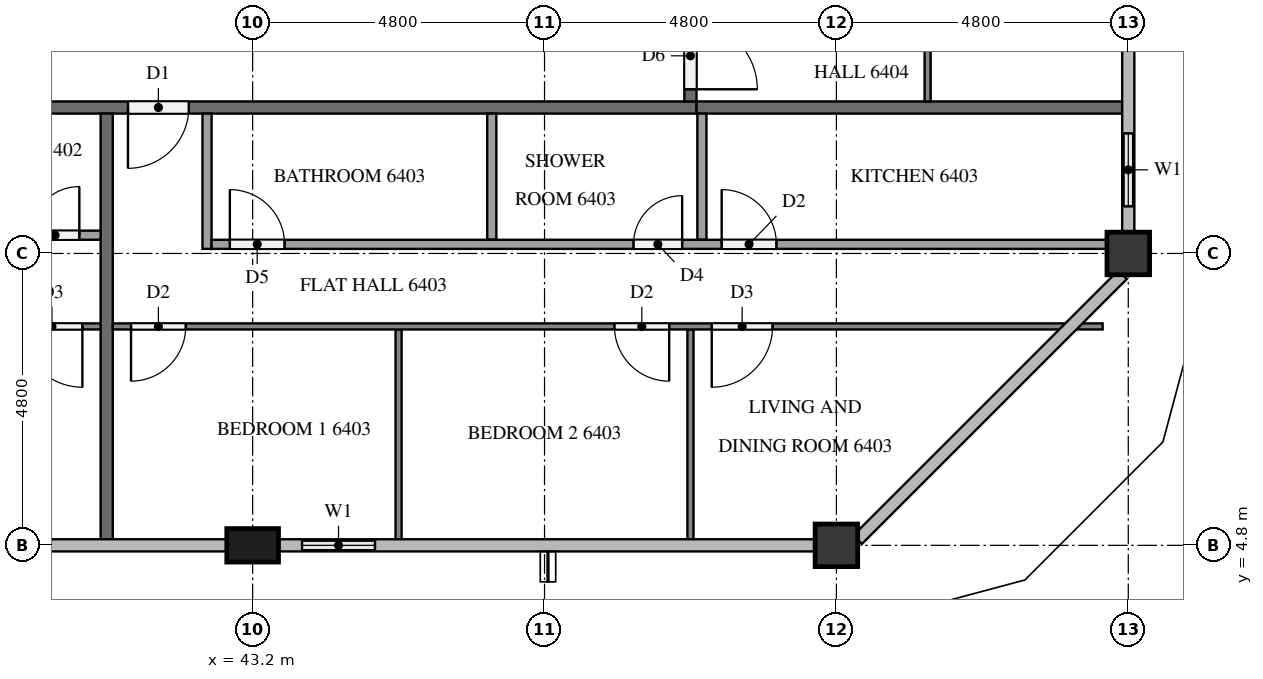
"""IFC4 building model, lengths in metres.
Left out: names, types, materials, properties, quantities, classifications, styles, units other than length and angle.
Written with IfcOpenShell. Run it as: python <this file> out.ifc"""

import sys

from ifc_helpers import new_model, si_unit, direction, frame, frame_2d, origin, origin_2d, place, context, subcontext, project, spatial, rectangle, extrude, element, fill, save


model = new_model("IFC4")
c1 = context("Model", 3, precision=1e-05, world=origin(), true_north=direction((0.0, 1.0)))
c2 = subcontext(c1, "Body", "Model", "MODEL_VIEW")
j1 = project(units=[si_unit("LENGTHUNIT", "METRE"), si_unit("PLANEANGLEUNIT", "RADIAN")], contexts=[c1])
p1 = place(None, origin())
s1 = spatial("IfcSite", under=j1, at=p1, CompositionType="ELEMENT")
p2 = place(p1, origin())
s2 = spatial("IfcBuilding", under=s1, at=p2, CompositionType="ELEMENT")
p3 = place(p2, frame((0.0, 0.0, 245.7)))
s3 = spatial("IfcBuildingStorey", under=s2, at=p3, CompositionType="ELEMENT", Elevation=245.7)
p4 = place(p3, frame((43.2, 4.8, 0.0), z_axis=(0.0, 0.0, 1.0), x_axis=(1.0, 0.0, 0.0)))
e1 = element("IfcColumn", 1, at=p4, inside=s3, PredefinedType="COLUMN", context=c2, shape_type="SweptSolid", body=[
    extrude(rectangle(XDim=0.85, YDim=0.55, at=origin_2d()), origin(), (0.0, 0.0, 1.0), 3.2),
])
for number, where, z_axis, x_axis in (
    (2, (52.8, 4.8, 0.0), (0.0, 0.0, 1.0), (1.0, 0.0, 0.0)),
    (3, (57.6, 9.6, 0.0), (0.0, 0.0, 1.0), (1.0, 0.0, 0.0)),
):
    element("IfcColumn", number, at=place(p3, frame(where, z_axis=z_axis, x_axis=x_axis)), inside=s3, PredefinedType="COLUMN", context=c2, shape_type="SweptSolid", body=[
        extrude(rectangle(XDim=0.7, YDim=0.7, at=origin_2d()), origin(), (0.0, 0.0, 1.0), 3.2),
    ])
p5 = place(p3, frame((43.625, 4.8, 0.0), z_axis=(0.0, 0.0, 1.0), x_axis=(1.0, 0.0, 0.0)))
e4 = element("IfcWall", 4, at=p5, inside=s3, PredefinedType="SOLIDWALL", context=c2, shape_type="SweptSolid", body=[
    extrude(rectangle(XDim=1.975, YDim=0.15, at=frame_2d((0.988, 0.0))), origin(), (0.0, 0.0, 1.0), 3.2),
])
p6 = place(p5, frame((0.387, 0.0, 0.9)))
e5 = element("IfcOpeningElement", 5, at=p6, cuts=e4, PredefinedType="OPENING", context=c2, shape_type="SweptSolid", body=[
    extrude(rectangle(XDim=1.2, YDim=1.4, at=frame_2d((0.6, 0.7))), frame((0.0, 0.085, 0.0), z_axis=(0.0, -1.0, 0.0), x_axis=(1.0, 0.0, 0.0)), (0.0, 0.0, 1.0), 0.17),
])
p7 = place(p3, frame((57.6, 9.95, 0.0), z_axis=(0.0, 0.0, 1.0), x_axis=(0.0, 1.0, 0.0)))
e6 = element("IfcWall", 6, at=p7, inside=s3, PredefinedType="SOLIDWALL", context=c2, shape_type="SweptSolid", body=[
    extrude(rectangle(XDim=2.05, YDim=0.15, at=frame_2d((1.025, 0.0))), origin(), (0.0, 0.0, 1.0), 3.2),
])
p8 = place(p7, frame((0.425, 0.0, 0.9)))
e7 = element("IfcOpeningElement", 7, at=p8, cuts=e6, PredefinedType="OPENING", context=c2, shape_type="SweptSolid", body=[
    extrude(rectangle(XDim=1.2, YDim=1.4, at=frame_2d((0.6, 0.7))), frame((0.0, 0.085, 0.0), z_axis=(0.0, -1.0, 0.0), x_axis=(1.0, 0.0, 0.0)), (0.0, 0.0, 1.0), 0.17),
])
p9 = place(p3, frame((50.5, 12.0, 0.0), z_axis=(0.0, 0.0, 1.0), x_axis=(-1.0, 0.0, 0.0)))
e8 = element("IfcWall", 8, at=p9, inside=s3, PredefinedType="PARTITIONING", context=c2, shape_type="SweptSolid", body=[
    extrude(rectangle(XDim=38.6, YDim=0.2, at=frame_2d((19.3, 0.0))), origin(), (0.0, 0.0, 1.0), 3.2),
])
p10 = place(p9, frame((37.1, 0.0, 0.0)))
e9 = element("IfcOpeningElement", 9, at=p10, cuts=e8, PredefinedType="OPENING", context=c2, shape_type="SweptSolid", body=[
    extrude(rectangle(XDim=1.1, YDim=2.1, at=frame_2d((0.55, 1.05))), frame((0.0, 0.11, 0.0), z_axis=(0.0, -1.0, 0.0), x_axis=(1.0, 0.0, 0.0)), (0.0, 0.0, 1.0), 0.22),
])
p11 = place(p9, frame((17.95, 0.0, 0.0)))
e10 = element("IfcOpeningElement", 10, at=p11, cuts=e8, PredefinedType="OPENING", context=c2, shape_type="SweptSolid", body=[
    extrude(rectangle(XDim=1.0, YDim=2.1, at=frame_2d((0.5, 1.05))), frame((0.0, 0.11, 0.0), z_axis=(0.0, -1.0, 0.0), x_axis=(1.0, 0.0, 0.0)), (0.0, 0.0, 1.0), 0.22),
])
p12 = place(p9, frame((8.35, 0.0, 0.0)))
e11 = element("IfcOpeningElement", 11, at=p12, cuts=e8, PredefinedType="OPENING", context=c2, shape_type="SweptSolid", body=[
    extrude(rectangle(XDim=1.0, YDim=2.1, at=frame_2d((0.5, 1.05))), frame((0.0, 0.11, 0.0), z_axis=(0.0, -1.0, 0.0), x_axis=(1.0, 0.0, 0.0)), (0.0, 0.0, 1.0), 0.22),
])
p13 = place(p3, frame((50.4, 40.7, 0.0), z_axis=(0.0, 0.0, 1.0), x_axis=(0.0, -1.0, 0.0)))
e12 = element("IfcWall", 12, at=p13, inside=s3, PredefinedType="PARTITIONING", context=c2, shape_type="SweptSolid", body=[
    extrude(rectangle(XDim=28.6, YDim=0.2, at=frame_2d((14.3, 0.0))), origin(), (0.0, 0.0, 1.0), 3.2),
])
p14 = place(p13, frame((27.3, 0.0, 0.0)))
e13 = element("IfcOpeningElement", 13, at=p14, cuts=e12, PredefinedType="OPENING", context=c2, shape_type="SweptSolid", body=[
    extrude(rectangle(XDim=1.1, YDim=2.1, at=frame_2d((0.55, 1.05))), frame((0.0, 0.11, 0.0), z_axis=(0.0, -1.0, 0.0), x_axis=(1.0, 0.0, 0.0)), (0.0, 0.0, 1.0), 0.22),
])
p15 = place(p13, frame((0.25, 0.0, 0.0)))
e14 = element("IfcOpeningElement", 14, at=p15, cuts=e12, PredefinedType="OPENING", context=c2, shape_type="SweptSolid", body=[
    extrude(rectangle(XDim=1.0, YDim=2.1, at=frame_2d((0.5, 1.05))), frame((0.0, 0.11, 0.0), z_axis=(0.0, -1.0, 0.0), x_axis=(1.0, 0.0, 0.0)), (0.0, 0.0, 1.0), 0.22),
])
for number, where, z_axis, x_axis in (
    (15, (40.8, 11.9, 0.0), (0.0, 0.0, 1.0), (0.0, -1.0, 0.0)),
    (16, (50.5, 12.0, 0.0), (0.0, 0.0, 1.0), (1.0, 0.0, 0.0)),
):
    element("IfcWall", number, at=place(p3, frame(where, z_axis=z_axis, x_axis=x_axis)), inside=s3, PredefinedType="PARTITIONING", context=c2, shape_type="SweptSolid", body=[
        extrude(rectangle(XDim=7.0, YDim=0.2, at=frame_2d((3.5, 0.0))), origin(), (0.0, 0.0, 1.0), 3.2),
    ])
p16 = place(p3, frame((40.7, 8.4, 0.0), z_axis=(0.0, 0.0, 1.0), x_axis=(-1.0, 0.0, 0.0)))
e17 = element("IfcWall", 17, at=p16, inside=s3, PredefinedType="PARTITIONING", context=c2, shape_type="SweptSolid", body=[
    extrude(rectangle(XDim=9.4, YDim=0.1, at=frame_2d((4.7, 0.0))), origin(), (0.0, 0.0, 1.0), 3.2),
])
p17 = place(p16, frame((8.2, 0.0, 0.0)))
e18 = element("IfcOpeningElement", 18, at=p17, cuts=e17, PredefinedType="OPENING", context=c2, shape_type="SweptSolid", body=[
    extrude(rectangle(XDim=0.9, YDim=2.1, at=frame_2d((0.45, 1.05))), frame((0.0, 0.06, 0.0), z_axis=(0.0, -1.0, 0.0), x_axis=(1.0, 0.0, 0.0)), (0.0, 0.0, 1.0), 0.12),
])
p18 = place(p16, frame((0.3, 0.0, 0.0)))
e19 = element("IfcOpeningElement", 19, at=p18, cuts=e17, PredefinedType="OPENING", context=c2, shape_type="SweptSolid", body=[
    extrude(rectangle(XDim=1.0, YDim=2.1, at=frame_2d((0.5, 1.05))), frame((0.0, 0.06, 0.0), z_axis=(0.0, -1.0, 0.0), x_axis=(1.0, 0.0, 0.0)), (0.0, 0.0, 1.0), 0.12),
])
p19 = place(p3, frame((32.925, 9.9, 0.0), z_axis=(0.0, 0.0, 1.0), x_axis=(1.0, 0.0, 0.0)))
e20 = element("IfcWall", 20, at=p19, inside=s3, PredefinedType="PARTITIONING", context=c2, shape_type="SweptSolid", body=[
    extrude(rectangle(XDim=7.775, YDim=0.15, at=frame_2d((3.887, 0.0))), origin(), (0.0, 0.0, 1.0), 3.2),
])
p20 = place(p19, frame((0.3, 0.0, 0.0)))
e21 = element("IfcOpeningElement", 21, at=p20, cuts=e20, PredefinedType="OPENING", context=c2, shape_type="SweptSolid", body=[
    extrude(rectangle(XDim=0.9, YDim=2.1, at=frame_2d((0.45, 1.05))), frame((0.0, 0.085, 0.0), z_axis=(0.0, -1.0, 0.0), x_axis=(1.0, 0.0, 0.0)), (0.0, 0.0, 1.0), 0.17),
])
p21 = place(p19, frame((6.625, 0.0, 0.0)))
e22 = element("IfcOpeningElement", 22, at=p21, cuts=e20, PredefinedType="OPENING", context=c2, shape_type="SweptSolid", body=[
    extrude(rectangle(XDim=0.8, YDim=2.1, at=frame_2d((0.4, 1.05))), frame((0.0, 0.085, 0.0), z_axis=(0.0, -1.0, 0.0), x_axis=(1.0, 0.0, 0.0)), (0.0, 0.0, 1.0), 0.17),
])
for number, where, z_axis, x_axis in (
    (23, (45.6, 8.35, 0.0), (0.0, 0.0, 1.0), (0.0, -1.0, 0.0)),
    (24, (50.4, 8.35, 0.0), (0.0, 0.0, 1.0), (0.0, -1.0, 0.0)),
):
    element("IfcWall", number, at=place(p3, frame(where, z_axis=z_axis, x_axis=x_axis)), inside=s3, PredefinedType="PARTITIONING", context=c2, shape_type="SweptSolid", body=[
        extrude(rectangle(XDim=3.45, YDim=0.1, at=frame_2d((1.725, 0.0))), origin(), (0.0, 0.0, 1.0), 3.2),
    ])
p22 = place(p3, frame((57.178, 8.4, 0.0), z_axis=(0.0, 0.0, 1.0), x_axis=(-1.0, 0.0, 0.0)))
e25 = element("IfcWall", 25, at=p22, inside=s3, PredefinedType="PARTITIONING", context=c2, shape_type="SweptSolid", body=[
    extrude(rectangle(XDim=16.279, YDim=0.1, at=frame_2d((8.139, 0.0))), origin(), (0.0, 0.0, 1.0), 3.2),
])
p23 = place(p22, frame((15.079, 0.0, 0.0)))
e26 = element("IfcOpeningElement", 26, at=p23, cuts=e25, PredefinedType="OPENING", context=c2, shape_type="SweptSolid", body=[
    extrude(rectangle(XDim=0.9, YDim=2.1, at=frame_2d((0.45, 1.05))), frame((0.0, 0.06, 0.0), z_axis=(0.0, -1.0, 0.0), x_axis=(1.0, 0.0, 0.0)), (0.0, 0.0, 1.0), 0.12),
])
p24 = place(p22, frame((7.128, 0.0, 0.0)))
e27 = element("IfcOpeningElement", 27, at=p24, cuts=e25, PredefinedType="OPENING", context=c2, shape_type="SweptSolid", body=[
    extrude(rectangle(XDim=0.9, YDim=2.1, at=frame_2d((0.45, 1.05))), frame((0.0, 0.06, 0.0), z_axis=(0.0, -1.0, 0.0), x_axis=(1.0, 0.0, 0.0)), (0.0, 0.0, 1.0), 0.12),
])
p25 = place(p22, frame((5.428, 0.0, 0.0)))
e28 = element("IfcOpeningElement", 28, at=p25, cuts=e25, PredefinedType="OPENING", context=c2, shape_type="SweptSolid", body=[
    extrude(rectangle(XDim=1.0, YDim=2.1, at=frame_2d((0.5, 1.05))), frame((0.0, 0.06, 0.0), z_axis=(0.0, -1.0, 0.0), x_axis=(1.0, 0.0, 0.0)), (0.0, 0.0, 1.0), 0.12),
])
for number, where, z_axis, x_axis in (
    (29, (47.133, 11.9, 0.0), (0.0, 0.0, 1.0), (0.0, -1.0, 0.0)),
    (30, (50.588, 11.9, 0.0), (0.0, 0.0, 1.0), (0.0, -1.0, 0.0)),
):
    element("IfcWall", number, at=place(p3, frame(where, z_axis=z_axis, x_axis=x_axis)), inside=s3, PredefinedType="PARTITIONING", context=c2, shape_type="SweptSolid", body=[
        extrude(rectangle(XDim=2.075, YDim=0.15, at=frame_2d((1.038, 0.0))), origin(), (0.0, 0.0, 1.0), 3.2),
    ])
p26 = place(p3, frame((42.45, 11.9, 0.0), z_axis=(0.0, 0.0, 1.0), x_axis=(0.0, -1.0, 0.0)))
e31 = element("IfcWall", 31, at=p26, inside=s3, PredefinedType="PARTITIONING", context=c2, shape_type="SweptSolid", body=[
    extrude(rectangle(XDim=2.225, YDim=0.15, at=frame_2d((1.112, 0.0))), origin(), (0.0, 0.0, 1.0), 3.2),
])
p27 = place(p3, frame((42.525, 9.75, 0.0), z_axis=(0.0, 0.0, 1.0), x_axis=(1.0, 0.0, 0.0)))
e32 = element("IfcWall", 32, at=p27, inside=s3, PredefinedType="PARTITIONING", context=c2, shape_type="SweptSolid", body=[
    extrude(rectangle(XDim=14.725, YDim=0.15, at=frame_2d((7.363, 0.0))), origin(), (0.0, 0.0, 1.0), 3.2),
])
p28 = place(p27, frame((0.3, 0.0, 0.0)))
e33 = element("IfcOpeningElement", 33, at=p28, cuts=e32, PredefinedType="OPENING", context=c2, shape_type="SweptSolid", body=[
    extrude(rectangle(XDim=0.9, YDim=2.1, at=frame_2d((0.45, 1.05))), frame((0.0, 0.085, 0.0), z_axis=(0.0, -1.0, 0.0), x_axis=(1.0, 0.0, 0.0)), (0.0, 0.0, 1.0), 0.17),
])
p29 = place(p27, frame((6.938, 0.0, 0.0)))
e34 = element("IfcOpeningElement", 34, at=p29, cuts=e32, PredefinedType="OPENING", context=c2, shape_type="SweptSolid", body=[
    extrude(rectangle(XDim=0.8, YDim=2.1, at=frame_2d((0.4, 1.05))), frame((0.0, 0.085, 0.0), z_axis=(0.0, -1.0, 0.0), x_axis=(1.0, 0.0, 0.0)), (0.0, 0.0, 1.0), 0.17),
])
p30 = place(p27, frame((8.388, 0.0, 0.0)))
e35 = element("IfcOpeningElement", 35, at=p30, cuts=e32, PredefinedType="OPENING", context=c2, shape_type="SweptSolid", body=[
    extrude(rectangle(XDim=0.9, YDim=2.1, at=frame_2d((0.45, 1.05))), frame((0.0, 0.085, 0.0), z_axis=(0.0, -1.0, 0.0), x_axis=(1.0, 0.0, 0.0)), (0.0, 0.0, 1.0), 0.17),
])
p31 = place(p3, frame((54.3, 31.1, 0.0), z_axis=(0.0, 0.0, 1.0), x_axis=(0.0, -1.0, 0.0)))
e36 = element("IfcWall", 36, at=p31, inside=s3, PredefinedType="PARTITIONING", context=c2, shape_type="SweptSolid", body=[
    extrude(rectangle(XDim=19.0, YDim=0.1, at=frame_2d((9.5, 0.0))), origin(), (0.0, 0.0, 1.0), 3.2),
])
p32 = place(p31, frame((14.65, 0.0, 0.0)))
e37 = element("IfcOpeningElement", 37, at=p32, cuts=e36, PredefinedType="OPENING", context=c2, shape_type="SweptSolid", body=[
    extrude(rectangle(XDim=0.9, YDim=2.1, at=frame_2d((0.45, 1.05))), frame((0.0, 0.06, 0.0), z_axis=(0.0, -1.0, 0.0), x_axis=(1.0, 0.0, 0.0)), (0.0, 0.0, 1.0), 0.12),
])
p33 = place(p31, frame((12.95, 0.0, 0.0)))
e38 = element("IfcOpeningElement", 38, at=p33, cuts=e36, PredefinedType="OPENING", context=c2, shape_type="SweptSolid", body=[
    extrude(rectangle(XDim=1.0, YDim=2.1, at=frame_2d((0.5, 1.05))), frame((0.0, 0.06, 0.0), z_axis=(0.0, -1.0, 0.0), x_axis=(1.0, 0.0, 0.0)), (0.0, 0.0, 1.0), 0.12),
])
p34 = place(p31, frame((5.05, 0.0, 0.0)))
e39 = element("IfcOpeningElement", 39, at=p34, cuts=e36, PredefinedType="OPENING", context=c2, shape_type="SweptSolid", body=[
    extrude(rectangle(XDim=0.9, YDim=2.1, at=frame_2d((0.45, 1.05))), frame((0.0, 0.06, 0.0), z_axis=(0.0, -1.0, 0.0), x_axis=(1.0, 0.0, 0.0)), (0.0, 0.0, 1.0), 0.12),
])
p35 = place(p31, frame((3.45, 0.0, 0.0)))
e40 = element("IfcOpeningElement", 40, at=p35, cuts=e36, PredefinedType="OPENING", context=c2, shape_type="SweptSolid", body=[
    extrude(rectangle(XDim=0.9, YDim=2.1, at=frame_2d((0.45, 1.05))), frame((0.0, 0.06, 0.0), z_axis=(0.0, -1.0, 0.0), x_axis=(1.0, 0.0, 0.0)), (0.0, 0.0, 1.0), 0.12),
])
p36 = place(p6, origin())
e41 = element("IfcWindow", 41, at=p36, inside=s3, PartitioningType="SINGLE_PANEL", PredefinedType="WINDOW", context=c2, shape_type="SweptSolid", body=[
    extrude(rectangle(XDim=1.2, YDim=1.4, at=frame_2d((0.6, 0.7))), frame((0.0, 0.03, 0.0), z_axis=(0.0, -1.0, 0.0), x_axis=(1.0, 0.0, 0.0)), (0.0, 0.0, 1.0), 0.06),
])
fill(e5, e41)
p37 = place(p8, origin())
e42 = element("IfcWindow", 42, at=p37, inside=s3, PartitioningType="SINGLE_PANEL", PredefinedType="WINDOW", context=c2, shape_type="SweptSolid", body=[
    extrude(rectangle(XDim=1.2, YDim=1.4, at=frame_2d((0.6, 0.7))), frame((0.0, 0.03, 0.0), z_axis=(0.0, -1.0, 0.0), x_axis=(1.0, 0.0, 0.0)), (0.0, 0.0, 1.0), 0.06),
])
fill(e7, e42)
p38 = place(p12, origin())
e43 = element("IfcDoor", 43, at=p38, inside=s3, OperationType="SINGLE_SWING_RIGHT", PredefinedType="DOOR", context=c2, shape_type="SweptSolid", body=[
    extrude(rectangle(XDim=1.0, YDim=2.1, at=frame_2d((0.5, 1.05))), frame((0.0, 0.025, 0.0), z_axis=(0.0, -1.0, 0.0), x_axis=(1.0, 0.0, 0.0)), (0.0, 0.0, 1.0), 0.05),
])
fill(e11, e43)
p39 = place(p14, origin())
e44 = element("IfcDoor", 44, at=p39, inside=s3, OperationType="SINGLE_SWING_RIGHT", PredefinedType="DOOR", context=c2, shape_type="SweptSolid", body=[
    extrude(rectangle(XDim=1.1, YDim=2.1, at=frame_2d((0.55, 1.05))), frame((0.0, 0.025, 0.0), z_axis=(0.0, -1.0, 0.0), x_axis=(1.0, 0.0, 0.0)), (0.0, 0.0, 1.0), 0.05),
])
fill(e13, e44)
p40 = place(p18, origin())
e45 = element("IfcDoor", 45, at=p40, inside=s3, OperationType="SINGLE_SWING_LEFT", PredefinedType="DOOR", context=c2, shape_type="SweptSolid", body=[
    extrude(rectangle(XDim=1.0, YDim=2.1, at=frame_2d((0.5, 1.05))), frame((0.0, 0.025, 0.0), z_axis=(0.0, -1.0, 0.0), x_axis=(1.0, 0.0, 0.0)), (0.0, 0.0, 1.0), 0.05),
])
fill(e19, e45)
p41 = place(p21, origin())
e46 = element("IfcDoor", 46, at=p41, inside=s3, OperationType="SINGLE_SWING_RIGHT", PredefinedType="DOOR", context=c2, shape_type="SweptSolid", body=[
    extrude(rectangle(XDim=0.8, YDim=2.1, at=frame_2d((0.4, 1.05))), frame((0.0, 0.025, 0.0), z_axis=(0.0, -1.0, 0.0), x_axis=(1.0, 0.0, 0.0)), (0.0, 0.0, 1.0), 0.05),
])
fill(e22, e46)
p42 = place(p23, origin())
e47 = element("IfcDoor", 47, at=p42, inside=s3, OperationType="SINGLE_SWING_RIGHT", PredefinedType="DOOR", context=c2, shape_type="SweptSolid", body=[
    extrude(rectangle(XDim=0.9, YDim=2.1, at=frame_2d((0.45, 1.05))), frame((0.0, 0.025, 0.0), z_axis=(0.0, -1.0, 0.0), x_axis=(1.0, 0.0, 0.0)), (0.0, 0.0, 1.0), 0.05),
])
fill(e26, e47)
p43 = place(p24, origin())
e48 = element("IfcDoor", 48, at=p43, inside=s3, OperationType="SINGLE_SWING_LEFT", PredefinedType="DOOR", context=c2, shape_type="SweptSolid", body=[
    extrude(rectangle(XDim=0.9, YDim=2.1, at=frame_2d((0.45, 1.05))), frame((0.0, 0.025, 0.0), z_axis=(0.0, -1.0, 0.0), x_axis=(1.0, 0.0, 0.0)), (0.0, 0.0, 1.0), 0.05),
])
fill(e27, e48)
p44 = place(p25, origin())
e49 = element("IfcDoor", 49, at=p44, inside=s3, OperationType="SINGLE_SWING_RIGHT", PredefinedType="DOOR", context=c2, shape_type="SweptSolid", body=[
    extrude(rectangle(XDim=1.0, YDim=2.1, at=frame_2d((0.5, 1.05))), frame((0.0, 0.025, 0.0), z_axis=(0.0, -1.0, 0.0), x_axis=(1.0, 0.0, 0.0)), (0.0, 0.0, 1.0), 0.05),
])
fill(e28, e49)
p45 = place(p28, origin())
e50 = element("IfcDoor", 50, at=p45, inside=s3, OperationType="SINGLE_SWING_LEFT", PredefinedType="DOOR", context=c2, shape_type="SweptSolid", body=[
    extrude(rectangle(XDim=0.9, YDim=2.1, at=frame_2d((0.45, 1.05))), frame((0.0, 0.025, 0.0), z_axis=(0.0, -1.0, 0.0), x_axis=(1.0, 0.0, 0.0)), (0.0, 0.0, 1.0), 0.05),
])
fill(e33, e50)
p46 = place(p29, origin())
e51 = element("IfcDoor", 51, at=p46, inside=s3, OperationType="SINGLE_SWING_RIGHT", PredefinedType="DOOR", context=c2, shape_type="SweptSolid", body=[
    extrude(rectangle(XDim=0.8, YDim=2.1, at=frame_2d((0.4, 1.05))), frame((0.0, 0.025, 0.0), z_axis=(0.0, -1.0, 0.0), x_axis=(1.0, 0.0, 0.0)), (0.0, 0.0, 1.0), 0.05),
])
fill(e34, e51)
p47 = place(p30, origin())
e52 = element("IfcDoor", 52, at=p47, inside=s3, OperationType="SINGLE_SWING_LEFT", PredefinedType="DOOR", context=c2, shape_type="SweptSolid", body=[
    extrude(rectangle(XDim=0.9, YDim=2.1, at=frame_2d((0.45, 1.05))), frame((0.0, 0.025, 0.0), z_axis=(0.0, -1.0, 0.0), x_axis=(1.0, 0.0, 0.0)), (0.0, 0.0, 1.0), 0.05),
])
fill(e35, e52)
save(model, sys.argv[1])
